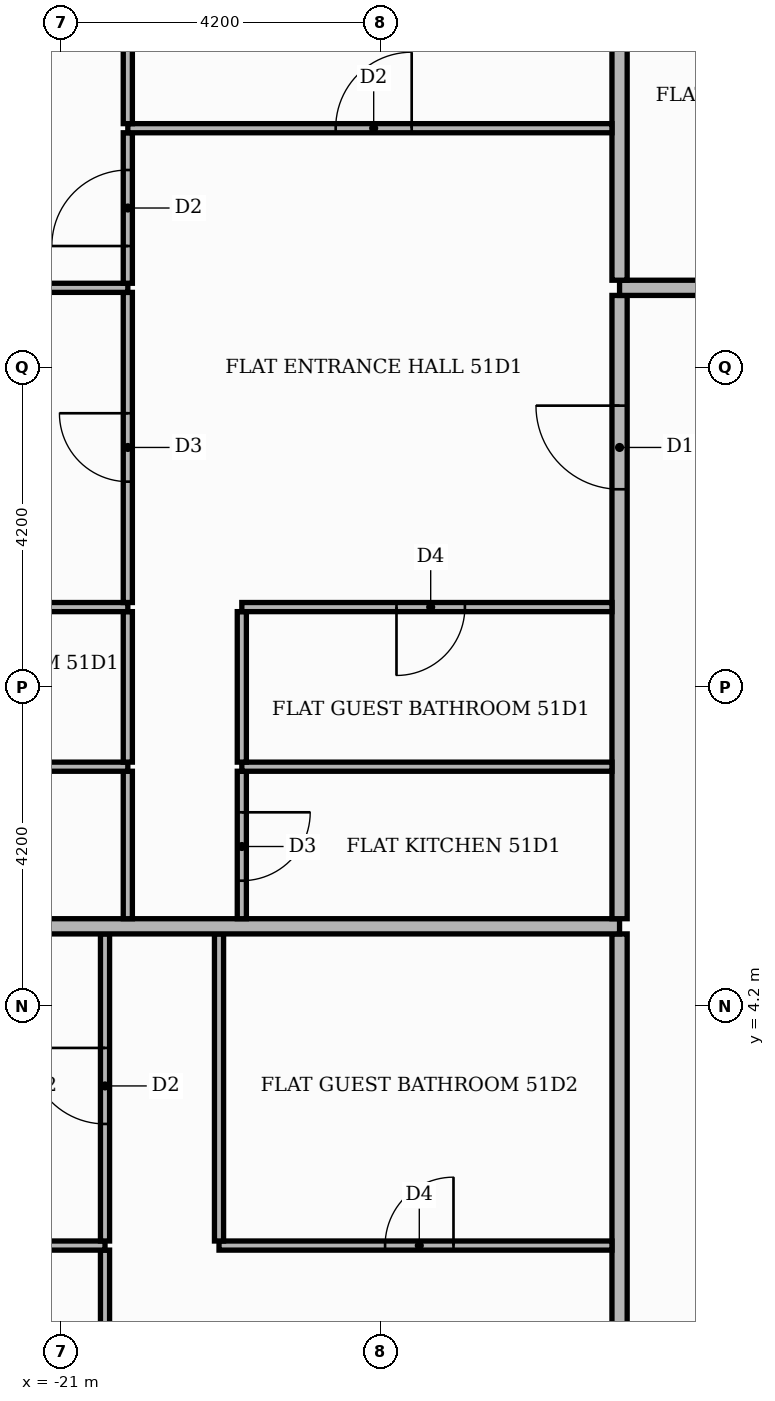
"""IFC4 building model, lengths in metres.
Left out: names, types, materials, properties, quantities, classifications, styles, units other than length and angle.
Written with IfcOpenShell. Run it as: python <this file> out.ifc"""

import sys

from ifc_helpers import new_model, si_unit, direction, frame, frame_2d, origin, place, context, subcontext, project, spatial, rectangle, extrude, element, fill, save


model = new_model("IFC4")
c1 = context("Model", 3, precision=1e-05, world=origin(), true_north=direction((0.0, 1.0)))
c2 = subcontext(c1, "Body", "Model", "MODEL_VIEW")
j1 = project(units=[si_unit("LENGTHUNIT", "METRE"), si_unit("PLANEANGLEUNIT", "RADIAN")], contexts=[c1])
p1 = place(None, origin())
s1 = spatial("IfcSite", under=j1, at=p1, CompositionType="ELEMENT")
p2 = place(p1, origin())
s2 = spatial("IfcBuilding", under=s1, at=p2, CompositionType="ELEMENT")
p3 = place(p2, frame((0.0, 0.0, 215.7)))
s3 = spatial("IfcBuildingStorey", under=s2, at=p3, CompositionType="ELEMENT", Elevation=215.7)
p4 = place(p3, frame((-13.65, -13.55, 0.0), z_axis=(0.0, 0.0, 1.0), x_axis=(0.0, 1.0, 0.0)))
e1 = element("IfcWall", 1, at=p4, inside=s3, PredefinedType="PARTITIONING", context=c2, shape_type="SweptSolid", body=[
    extrude(rectangle(XDim=18.7, YDim=0.2, at=frame_2d((9.35, 0.0))), origin(), (0.0, 0.0, 1.0), 3.48),
])
p5 = place(p4, frame((11.95, 0.0, 0.0)))
e2 = element("IfcOpeningElement", 2, at=p5, cuts=e1, PredefinedType="OPENING", context=c2, shape_type="SweptSolid", body=[
    extrude(rectangle(XDim=1.1, YDim=2.4, at=frame_2d((0.55, 1.2))), frame((0.0, 0.11, 0.0), z_axis=(0.0, -1.0, 0.0), x_axis=(1.0, 0.0, 0.0)), (0.0, 0.0, 1.0), 0.22),
])
p6 = place(p3, frame((-20.42, -3.09, 0.0), z_axis=(0.0, 0.0, 1.0), x_axis=(0.0, 1.0, 0.0)))
e3 = element("IfcWall", 3, at=p6, inside=s3, PredefinedType="PARTITIONING", context=c2, shape_type="SweptSolid", body=[
    extrude(rectangle(XDim=4.08, YDim=0.12, at=frame_2d((2.04, 0.0))), origin(), (0.0, 0.0, 1.0), 3.48),
])
p7 = place(p6, frame((1.59, 0.0, 0.0)))
e4 = element("IfcOpeningElement", 4, at=p7, cuts=e3, PredefinedType="OPENING", context=c2, shape_type="SweptSolid", body=[
    extrude(rectangle(XDim=0.9, YDim=2.1, at=frame_2d((0.45, 1.05))), frame((0.0, 0.07, 0.0), z_axis=(0.0, -1.0, 0.0), x_axis=(1.0, 0.0, 0.0)), (0.0, 0.0, 1.0), 0.14),
])
p8 = place(p3, frame((-25.42, 1.05, 0.0), z_axis=(0.0, 0.0, 1.0), x_axis=(1.0, 0.0, 0.0)))
e5 = element("IfcWall", 5, at=p8, inside=s3, PredefinedType="PARTITIONING", context=c2, shape_type="SweptSolid", body=[
    extrude(rectangle(XDim=5.0, YDim=0.12, at=frame_2d((2.5, 0.0))), origin(), (0.0, 0.0, 1.0), 3.48),
])
p9 = place(p3, frame((-18.92, 1.05, 0.0), z_axis=(0.0, 0.0, 1.0), x_axis=(1.0, 0.0, 0.0)))
e6 = element("IfcWall", 6, at=p9, inside=s3, PredefinedType="PARTITIONING", context=c2, shape_type="SweptSolid", body=[
    extrude(rectangle(XDim=5.17, YDim=0.12, at=frame_2d((2.585, 0.0))), origin(), (0.0, 0.0, 1.0), 3.48),
])
p10 = place(p9, frame((2.185, 0.0, 0.0)))
e7 = element("IfcOpeningElement", 7, at=p10, cuts=e6, PredefinedType="OPENING", context=c2, shape_type="SweptSolid", body=[
    extrude(rectangle(XDim=0.9, YDim=2.1, at=frame_2d((0.45, 1.05))), frame((0.0, 0.07, 0.0), z_axis=(0.0, -1.0, 0.0), x_axis=(1.0, 0.0, 0.0)), (0.0, 0.0, 1.0), 0.14),
])
p11 = place(p3, frame((-20.42, 1.11, 0.0), z_axis=(0.0, 0.0, 1.0), x_axis=(0.0, 1.0, 0.0)))
e8 = element("IfcWall", 8, at=p11, inside=s3, PredefinedType="PARTITIONING", context=c2, shape_type="SweptSolid", body=[
    extrude(rectangle(XDim=4.04, YDim=0.12, at=frame_2d((2.02, 0.0))), origin(), (0.0, 0.0, 1.0), 3.48),
])
p12 = place(p11, frame((1.54, 0.0, 0.0)))
e9 = element("IfcOpeningElement", 9, at=p12, cuts=e8, PredefinedType="OPENING", context=c2, shape_type="SweptSolid", body=[
    extrude(rectangle(XDim=1.0, YDim=2.1, at=frame_2d((0.5, 1.05))), frame((0.0, 0.07, 0.0), z_axis=(0.0, -1.0, 0.0), x_axis=(1.0, 0.0, 0.0)), (0.0, 0.0, 1.0), 0.14),
])
p13 = place(p3, frame((-18.92, 1.11, 0.0), z_axis=(0.0, 0.0, 1.0), x_axis=(0.0, 1.0, 0.0)))
e10 = element("IfcWall", 10, at=p13, inside=s3, PredefinedType="PARTITIONING", context=c2, shape_type="SweptSolid", body=[
    extrude(rectangle(XDim=4.04, YDim=0.12, at=frame_2d((2.02, 0.0))), origin(), (0.0, 0.0, 1.0), 3.48),
])
p14 = place(p3, frame((-25.42, 5.25, 0.0), z_axis=(0.0, 0.0, 1.0), x_axis=(1.0, 0.0, 0.0)))
e11 = element("IfcWall", 11, at=p14, inside=s3, PredefinedType="PARTITIONING", context=c2, shape_type="SweptSolid", body=[
    extrude(rectangle(XDim=11.77, YDim=0.2, at=frame_2d((5.885, 0.0))), origin(), (0.0, 0.0, 1.0), 3.48),
])
p15 = place(p3, frame((-20.12, 5.35, 0.0), z_axis=(0.0, 0.0, 1.0), x_axis=(0.0, 1.0, 0.0)))
e12 = element("IfcWall", 12, at=p15, inside=s3, PredefinedType="PARTITIONING", context=c2, shape_type="SweptSolid", body=[
    extrude(rectangle(XDim=1.94, YDim=0.12, at=frame_2d((0.97, 0.0))), origin(), (0.0, 0.0, 1.0), 3.48),
])
p16 = place(p3, frame((-18.62, 5.35, 0.0), z_axis=(0.0, 0.0, 1.0), x_axis=(0.0, 1.0, 0.0)))
e13 = element("IfcWall", 13, at=p16, inside=s3, PredefinedType="PARTITIONING", context=c2, shape_type="SweptSolid", body=[
    extrude(rectangle(XDim=1.94, YDim=0.12, at=frame_2d((0.97, 0.0))), origin(), (0.0, 0.0, 1.0), 3.48),
])
p17 = place(p16, frame((0.5, 0.0, 0.0)))
e14 = element("IfcOpeningElement", 14, at=p17, cuts=e13, PredefinedType="OPENING", context=c2, shape_type="SweptSolid", body=[
    extrude(rectangle(XDim=0.9, YDim=2.1, at=frame_2d((0.45, 1.05))), frame((0.0, 0.07, 0.0), z_axis=(0.0, -1.0, 0.0), x_axis=(1.0, 0.0, 0.0)), (0.0, 0.0, 1.0), 0.14),
])
p18 = place(p3, frame((-13.65, 5.35, 0.0), z_axis=(0.0, 0.0, 1.0), x_axis=(0.0, 1.0, 0.0)))
e15 = element("IfcWall", 15, at=p18, inside=s3, PredefinedType="PARTITIONING", context=c2, shape_type="SweptSolid", body=[
    extrude(rectangle(XDim=8.2, YDim=0.2, at=frame_2d((4.1, 0.0))), origin(), (0.0, 0.0, 1.0), 3.48),
])
p19 = place(p18, frame((5.65, 0.0, 0.0)))
e16 = element("IfcOpeningElement", 16, at=p19, cuts=e15, PredefinedType="OPENING", context=c2, shape_type="SweptSolid", body=[
    extrude(rectangle(XDim=1.1, YDim=2.4, at=frame_2d((0.55, 1.2))), frame((0.0, 0.11, 0.0), z_axis=(0.0, -1.0, 0.0), x_axis=(1.0, 0.0, 0.0)), (0.0, 0.0, 1.0), 0.22),
])
p20 = place(p3, frame((-25.42, 7.35, 0.0), z_axis=(0.0, 0.0, 1.0), x_axis=(1.0, 0.0, 0.0)))
e17 = element("IfcWall", 17, at=p20, inside=s3, PredefinedType="PARTITIONING", context=c2, shape_type="SweptSolid", body=[
    extrude(rectangle(XDim=5.3, YDim=0.12, at=frame_2d((2.65, 0.0))), origin(), (0.0, 0.0, 1.0), 3.48),
])
p21 = place(p20, frame((2.05, 0.0, 0.0)))
e18 = element("IfcOpeningElement", 18, at=p21, cuts=e17, PredefinedType="OPENING", context=c2, shape_type="SweptSolid", body=[
    extrude(rectangle(XDim=0.9, YDim=2.1, at=frame_2d((0.45, 1.05))), frame((0.0, 0.07, 0.0), z_axis=(0.0, -1.0, 0.0), x_axis=(1.0, 0.0, 0.0)), (0.0, 0.0, 1.0), 0.14),
])
p22 = place(p3, frame((-18.62, 7.35, 0.0), z_axis=(0.0, 0.0, 1.0), x_axis=(1.0, 0.0, 0.0)))
e19 = element("IfcWall", 19, at=p22, inside=s3, PredefinedType="PARTITIONING", context=c2, shape_type="SweptSolid", body=[
    extrude(rectangle(XDim=4.87, YDim=0.12, at=frame_2d((2.435, 0.0))), origin(), (0.0, 0.0, 1.0), 3.48),
])
for number, where, z_axis, x_axis in (
    (20, (-20.12, 7.41, 0.0), (0.0, 0.0, 1.0), (0.0, 1.0, 0.0)),
    (21, (-18.62, 7.41, 0.0), (0.0, 0.0, 1.0), (0.0, 1.0, 0.0)),
):
    element("IfcWall", number, at=place(p3, frame(where, z_axis=z_axis, x_axis=x_axis)), inside=s3, PredefinedType="PARTITIONING", context=c2, shape_type="SweptSolid", body=[
        extrude(rectangle(XDim=1.98, YDim=0.12, at=frame_2d((0.99, 0.0))), origin(), (0.0, 0.0, 1.0), 3.48),
    ])
p23 = place(p3, frame((-25.42, 9.45, 0.0), z_axis=(0.0, 0.0, 1.0), x_axis=(1.0, 0.0, 0.0)))
e22 = element("IfcWall", 22, at=p23, inside=s3, PredefinedType="PARTITIONING", context=c2, shape_type="SweptSolid", body=[
    extrude(rectangle(XDim=5.3, YDim=0.12, at=frame_2d((2.65, 0.0))), origin(), (0.0, 0.0, 1.0), 3.48),
])
p24 = place(p23, frame((2.05, 0.0, 0.0)))
e23 = element("IfcOpeningElement", 23, at=p24, cuts=e22, PredefinedType="OPENING", context=c2, shape_type="SweptSolid", body=[
    extrude(rectangle(XDim=0.9, YDim=2.1, at=frame_2d((0.45, 1.05))), frame((0.0, 0.07, 0.0), z_axis=(0.0, -1.0, 0.0), x_axis=(1.0, 0.0, 0.0)), (0.0, 0.0, 1.0), 0.14),
])
p25 = place(p3, frame((-18.62, 9.45, 0.0), z_axis=(0.0, 0.0, 1.0), x_axis=(1.0, 0.0, 0.0)))
e24 = element("IfcWall", 24, at=p25, inside=s3, PredefinedType="PARTITIONING", context=c2, shape_type="SweptSolid", body=[
    extrude(rectangle(XDim=4.87, YDim=0.12, at=frame_2d((2.435, 0.0))), origin(), (0.0, 0.0, 1.0), 3.48),
])
p26 = place(p25, frame((2.035, 0.0, 0.0)))
e25 = element("IfcOpeningElement", 25, at=p26, cuts=e24, PredefinedType="OPENING", context=c2, shape_type="SweptSolid", body=[
    extrude(rectangle(XDim=0.9, YDim=2.1, at=frame_2d((0.45, 1.05))), frame((0.0, 0.07, 0.0), z_axis=(0.0, -1.0, 0.0), x_axis=(1.0, 0.0, 0.0)), (0.0, 0.0, 1.0), 0.14),
])
p27 = place(p3, frame((-20.12, 9.51, 0.0), z_axis=(0.0, 0.0, 1.0), x_axis=(0.0, 1.0, 0.0)))
e26 = element("IfcWall", 26, at=p27, inside=s3, PredefinedType="PARTITIONING", context=c2, shape_type="SweptSolid", body=[
    extrude(rectangle(XDim=4.08, YDim=0.12, at=frame_2d((2.04, 0.0))), origin(), (0.0, 0.0, 1.0), 3.48),
])
p28 = place(p27, frame((1.59, 0.0, 0.0)))
e27 = element("IfcOpeningElement", 27, at=p28, cuts=e26, PredefinedType="OPENING", context=c2, shape_type="SweptSolid", body=[
    extrude(rectangle(XDim=0.9, YDim=2.1, at=frame_2d((0.45, 1.05))), frame((0.0, 0.07, 0.0), z_axis=(0.0, -1.0, 0.0), x_axis=(1.0, 0.0, 0.0)), (0.0, 0.0, 1.0), 0.14),
])
p29 = place(p3, frame((-25.42, 13.65, 0.0), z_axis=(0.0, 0.0, 1.0), x_axis=(1.0, 0.0, 0.0)))
e28 = element("IfcWall", 28, at=p29, inside=s3, PredefinedType="PARTITIONING", context=c2, shape_type="SweptSolid", body=[
    extrude(rectangle(XDim=5.3, YDim=0.12, at=frame_2d((2.65, 0.0))), origin(), (0.0, 0.0, 1.0), 3.48),
])
p30 = place(p3, frame((-13.65, 13.65, 0.0), z_axis=(0.0, 0.0, 1.0), x_axis=(1.0, 0.0, 0.0)))
e29 = element("IfcWall", 29, at=p30, inside=s3, PredefinedType="PARTITIONING", context=c2, shape_type="SweptSolid", body=[
    extrude(rectangle(XDim=39.07, YDim=0.2, at=frame_2d((19.535, 0.0))), origin(), (0.0, 0.0, 1.0), 3.48),
])
p31 = place(p30, frame((24.65, 0.0, 0.0)))
e30 = element("IfcOpeningElement", 30, at=p31, cuts=e29, PredefinedType="OPENING", context=c2, shape_type="SweptSolid", body=[
    extrude(rectangle(XDim=1.1, YDim=2.4, at=frame_2d((0.55, 1.2))), frame((0.0, 0.11, 0.0), z_axis=(0.0, -1.0, 0.0), x_axis=(1.0, 0.0, 0.0)), (0.0, 0.0, 1.0), 0.22),
])
p32 = place(p3, frame((-20.12, 13.71, 0.0), z_axis=(0.0, 0.0, 1.0), x_axis=(0.0, 1.0, 0.0)))
e31 = element("IfcWall", 31, at=p32, inside=s3, PredefinedType="PARTITIONING", context=c2, shape_type="SweptSolid", body=[
    extrude(rectangle(XDim=1.98, YDim=0.12, at=frame_2d((0.99, 0.0))), origin(), (0.0, 0.0, 1.0), 3.48),
])
p33 = place(p32, frame((0.49, 0.0, 0.0)))
e32 = element("IfcOpeningElement", 32, at=p33, cuts=e31, PredefinedType="OPENING", context=c2, shape_type="SweptSolid", body=[
    extrude(rectangle(XDim=1.0, YDim=2.1, at=frame_2d((0.5, 1.05))), frame((0.0, 0.07, 0.0), z_axis=(0.0, -1.0, 0.0), x_axis=(1.0, 0.0, 0.0)), (0.0, 0.0, 1.0), 0.14),
])
p34 = place(p3, frame((-13.65, 13.75, 0.0), z_axis=(0.0, 0.0, 1.0), x_axis=(0.0, 1.0, 0.0)))
e33 = element("IfcWall", 33, at=p34, inside=s3, PredefinedType="PARTITIONING", context=c2, shape_type="SweptSolid", body=[
    extrude(rectangle(XDim=11.67, YDim=0.2, at=frame_2d((5.835, 0.0))), origin(), (0.0, 0.0, 1.0), 3.48),
])
p35 = place(p3, frame((-20.12, 15.75, 0.0), z_axis=(0.0, 0.0, 1.0), x_axis=(1.0, 0.0, 0.0)))
e34 = element("IfcWall", 34, at=p35, inside=s3, PredefinedType="PARTITIONING", context=c2, shape_type="SweptSolid", body=[
    extrude(rectangle(XDim=6.37, YDim=0.12, at=frame_2d((3.185, 0.0))), origin(), (0.0, 0.0, 1.0), 3.48),
])
p36 = place(p35, frame((2.735, 0.0, 0.0)))
e35 = element("IfcOpeningElement", 35, at=p36, cuts=e34, PredefinedType="OPENING", context=c2, shape_type="SweptSolid", body=[
    extrude(rectangle(XDim=1.0, YDim=2.1, at=frame_2d((0.5, 1.05))), frame((0.0, 0.07, 0.0), z_axis=(0.0, -1.0, 0.0), x_axis=(1.0, 0.0, 0.0)), (0.0, 0.0, 1.0), 0.14),
])
p37 = place(p3, frame((-20.12, 15.81, 0.0), z_axis=(0.0, 0.0, 1.0), x_axis=(0.0, 1.0, 0.0)))
e36 = element("IfcWall", 36, at=p37, inside=s3, PredefinedType="PARTITIONING", context=c2, shape_type="SweptSolid", body=[
    extrude(rectangle(XDim=9.61, YDim=0.12, at=frame_2d((4.805, 0.0))), origin(), (0.0, 0.0, 1.0), 3.48),
])
p38 = place(p19, origin())
e37 = element("IfcDoor", 37, at=p38, inside=s3, OperationType="SINGLE_SWING_RIGHT", PredefinedType="DOOR", context=c2, shape_type="SweptSolid", body=[
    extrude(rectangle(XDim=1.1, YDim=2.4, at=frame_2d((0.55, 1.2))), frame((0.0, 0.025, 0.0), z_axis=(0.0, -1.0, 0.0), x_axis=(1.0, 0.0, 0.0)), (0.0, 0.0, 1.0), 0.05),
])
fill(e16, e37)
p39 = place(p36, origin())
e38 = element("IfcDoor", 38, at=p39, inside=s3, OperationType="SINGLE_SWING_RIGHT", PredefinedType="DOOR", context=c2, shape_type="SweptSolid", body=[
    extrude(rectangle(XDim=1.0, YDim=2.1, at=frame_2d((0.5, 1.05))), frame((0.0, 0.025, 0.0), z_axis=(0.0, -1.0, 0.0), x_axis=(1.0, 0.0, 0.0)), (0.0, 0.0, 1.0), 0.05),
])
fill(e35, e38)
p40 = place(p26, frame((0.9, 0.0, 0.0), z_axis=(0.0, 0.0, 1.0), x_axis=(-1.0, 0.0, 0.0)))
e39 = element("IfcDoor", 39, at=p40, inside=s3, OperationType="SINGLE_SWING_LEFT", PredefinedType="DOOR", context=c2, shape_type="SweptSolid", body=[
    extrude(rectangle(XDim=0.9, YDim=2.1, at=frame_2d((0.45, 1.05))), frame((0.0, 0.025, 0.0), z_axis=(0.0, -1.0, 0.0), x_axis=(1.0, 0.0, 0.0)), (0.0, 0.0, 1.0), 0.05),
])
fill(e25, e39)
p41 = place(p17, frame((0.9, 0.0, 0.0), z_axis=(0.0, 0.0, 1.0), x_axis=(-1.0, 0.0, 0.0)))
e40 = element("IfcDoor", 40, at=p41, inside=s3, OperationType="SINGLE_SWING_RIGHT", PredefinedType="DOOR", context=c2, shape_type="SweptSolid", body=[
    extrude(rectangle(XDim=0.9, YDim=2.1, at=frame_2d((0.45, 1.05))), frame((0.0, 0.025, 0.0), z_axis=(0.0, -1.0, 0.0), x_axis=(1.0, 0.0, 0.0)), (0.0, 0.0, 1.0), 0.05),
])
fill(e14, e40)
p42 = place(p33, origin())
e41 = element("IfcDoor", 41, at=p42, inside=s3, OperationType="SINGLE_SWING_LEFT", PredefinedType="DOOR", context=c2, shape_type="SweptSolid", body=[
    extrude(rectangle(XDim=1.0, YDim=2.1, at=frame_2d((0.5, 1.05))), frame((0.0, 0.025, 0.0), z_axis=(0.0, -1.0, 0.0), x_axis=(1.0, 0.0, 0.0)), (0.0, 0.0, 1.0), 0.05),
])
fill(e32, e41)
p43 = place(p28, origin())
e42 = element("IfcDoor", 42, at=p43, inside=s3, OperationType="SINGLE_SWING_RIGHT", PredefinedType="DOOR", context=c2, shape_type="SweptSolid", body=[
    extrude(rectangle(XDim=0.9, YDim=2.1, at=frame_2d((0.45, 1.05))), frame((0.0, 0.025, 0.0), z_axis=(0.0, -1.0, 0.0), x_axis=(1.0, 0.0, 0.0)), (0.0, 0.0, 1.0), 0.05),
])
fill(e27, e42)
p44 = place(p10, origin())
e43 = element("IfcDoor", 43, at=p44, inside=s3, OperationType="SINGLE_SWING_RIGHT", PredefinedType="DOOR", context=c2, shape_type="SweptSolid", body=[
    extrude(rectangle(XDim=0.9, YDim=2.1, at=frame_2d((0.45, 1.05))), frame((0.0, 0.025, 0.0), z_axis=(0.0, -1.0, 0.0), x_axis=(1.0, 0.0, 0.0)), (0.0, 0.0, 1.0), 0.05),
])
fill(e7, e43)
p45 = place(p12, origin())
e44 = element("IfcDoor", 44, at=p45, inside=s3, OperationType="SINGLE_SWING_RIGHT", PredefinedType="DOOR", context=c2, shape_type="SweptSolid", body=[
    extrude(rectangle(XDim=1.0, YDim=2.1, at=frame_2d((0.5, 1.05))), frame((0.0, 0.025, 0.0), z_axis=(0.0, -1.0, 0.0), x_axis=(1.0, 0.0, 0.0)), (0.0, 0.0, 1.0), 0.05),
])
fill(e9, e44)
save(model, sys.argv[1])
